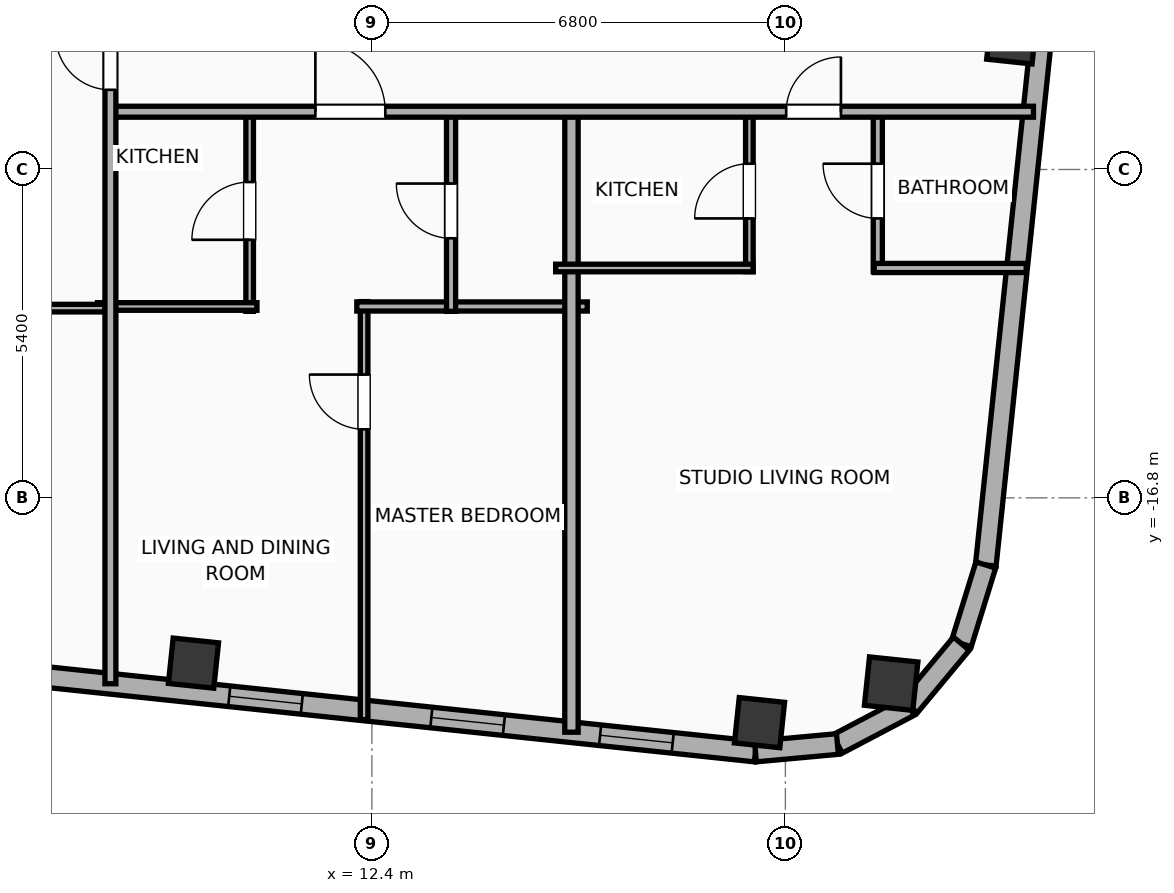
"""IFC4 building model, lengths in metres.
Left out: names, types, materials, properties, quantities, classifications, styles, units other than length and angle.
Written with IfcOpenShell. Run it as: python <this file> out.ifc"""

import sys

from ifc_helpers import new_model, si_unit, direction, frame, frame_2d, origin, origin_2d, place, context, subcontext, project, spatial, rectangle, hollow_rectangle, hollow_circle, extrude, element, fill, save


model = new_model("IFC4")
c1 = context("Model", 3, precision=1e-05, world=origin(), true_north=direction((0.0, 1.0)))
c2 = subcontext(c1, "Body", "Model", "MODEL_VIEW")
j1 = project(units=[si_unit("LENGTHUNIT", "METRE"), si_unit("PLANEANGLEUNIT", "RADIAN")], contexts=[c1])
p1 = place(None, origin())
s1 = spatial("IfcSite", under=j1, at=p1, CompositionType="ELEMENT")
p2 = place(p1, origin())
s2 = spatial("IfcBuilding", under=s1, at=p2, CompositionType="ELEMENT")
p3 = place(p2, frame((0.0, 0.0, 263.9)))
s3 = spatial("IfcBuildingStorey", under=s2, at=p3, CompositionType="ELEMENT", Elevation=263.9)
for number, where, z_axis, x_axis in (
    (1, (9.466, -19.518, 0.0), (0.0, 0.0, 1.0), (0.995, -0.105, 0.0)),
    (2, (18.775, -20.497, 0.0), (0.0, 0.0, 1.0), (0.995, -0.105, 0.0)),
):
    element("IfcColumn", number, at=place(p3, frame(where, z_axis=z_axis, x_axis=x_axis)), inside=s3, PredefinedType="COLUMN", context=c2, shape_type="SweptSolid", body=[
        extrude(hollow_rectangle(XDim=0.75, YDim=0.75, WallThickness=0.025, at=origin_2d()), origin(), (0.0, 0.0, 1.0), 3.9),
    ])
p4 = place(p3, frame((20.939, -19.855, 0.0), z_axis=(0.0, 0.0, 1.0), x_axis=(0.994521895368, -0.104528463268, 0.0)))
e3 = element("IfcColumn", 3, at=p4, inside=s3, PredefinedType="COLUMN", context=c2, shape_type="SweptSolid", body=[
    extrude(hollow_circle(Radius=0.4, WallThickness=0.028, at=origin_2d()), origin(), (0.0, 0.0, 1.0), 3.9),
])
p5 = place(p3, frame((22.923, -9.252, 0.0), z_axis=(0.0, 0.0, 1.0), x_axis=(0.994521895368, -0.104528463268, 0.0)))
e4 = element("IfcColumn", 4, at=p5, inside=s3, PredefinedType="COLUMN", context=c2, shape_type="SweptSolid", body=[
    extrude(hollow_rectangle(XDim=0.75, YDim=0.75, WallThickness=0.025, at=origin_2d()), origin(), (0.0, 0.0, 1.0), 3.9),
])
p6 = place(p3, frame((18.708, -20.972, 0.0), z_axis=(0.0, 0.0, 1.0), x_axis=(-0.994521888554, 0.104528528102, 0.0)))
e5 = element("IfcWall", 5, at=p6, inside=s3, PredefinedType="ELEMENTEDWALL", context=c2, shape_type="SweptSolid", body=[
    extrude(rectangle(XDim=46.766, YDim=0.34, at=frame_2d((23.383, 0.0))), origin(), (0.0, 0.0, 1.0), 3.65),
])
p7 = place(p6, frame((23.833, 0.0, 0.75)))
e6 = element("IfcOpeningElement", 6, at=p7, cuts=e5, PredefinedType="OPENING", context=c2, shape_type="SweptSolid", body=[
    extrude(rectangle(XDim=2.4, YDim=2.1, at=frame_2d((1.2, 1.05))), frame((0.0, 0.18, 0.0), z_axis=(0.0, -1.0, 0.0), x_axis=(1.0, 0.0, 0.0)), (0.0, 0.0, 1.0), 0.36),
])
p8 = place(p6, frame((38.622, 0.0, 0.75)))
e7 = element("IfcOpeningElement", 7, at=p8, cuts=e5, PredefinedType="OPENING", context=c2, shape_type="SweptSolid", body=[
    extrude(rectangle(XDim=2.4, YDim=2.1, at=frame_2d((1.2, 1.05))), frame((0.0, 0.18, 0.0), z_axis=(0.0, -1.0, 0.0), x_axis=(1.0, 0.0, 0.0)), (0.0, 0.0, 1.0), 0.36),
])
p9 = place(p6, frame((44.402, 0.0, 0.75)))
e8 = element("IfcOpeningElement", 8, at=p9, cuts=e5, PredefinedType="OPENING", context=c2, shape_type="SweptSolid", body=[
    extrude(rectangle(XDim=1.2, YDim=2.05, at=frame_2d((0.6, 1.025))), frame((0.0, 0.18, 0.0), z_axis=(0.0, -1.0, 0.0), x_axis=(1.0, 0.0, 0.0)), (0.0, 0.0, 1.0), 0.36),
])
p10 = place(p6, frame((42.406, 0.0, 0.75)))
e9 = element("IfcOpeningElement", 9, at=p10, cuts=e5, PredefinedType="OPENING", context=c2, shape_type="SweptSolid", body=[
    extrude(rectangle(XDim=1.2, YDim=2.05, at=frame_2d((0.6, 1.025))), frame((0.0, 0.18, 0.0), z_axis=(0.0, -1.0, 0.0), x_axis=(1.0, 0.0, 0.0)), (0.0, 0.0, 1.0), 0.36),
])
p11 = place(p6, frame((34.933, 0.0, 0.75)))
e10 = element("IfcOpeningElement", 10, at=p11, cuts=e5, PredefinedType="OPENING", context=c2, shape_type="SweptSolid", body=[
    extrude(rectangle(XDim=1.2, YDim=2.05, at=frame_2d((0.6, 1.025))), frame((0.0, 0.18, 0.0), z_axis=(0.0, -1.0, 0.0), x_axis=(1.0, 0.0, 0.0)), (0.0, 0.0, 1.0), 0.36),
])
p12 = place(p6, frame((28.631, 0.0, 0.75)))
e11 = element("IfcOpeningElement", 11, at=p12, cuts=e5, PredefinedType="OPENING", context=c2, shape_type="SweptSolid", body=[
    extrude(rectangle(XDim=1.2, YDim=2.05, at=frame_2d((0.6, 1.025))), frame((0.0, 0.18, 0.0), z_axis=(0.0, -1.0, 0.0), x_axis=(1.0, 0.0, 0.0)), (0.0, 0.0, 1.0), 0.36),
])
p13 = place(p6, frame((30.896, 0.0, 0.75)))
e12 = element("IfcOpeningElement", 12, at=p13, cuts=e5, PredefinedType="OPENING", context=c2, shape_type="SweptSolid", body=[
    extrude(rectangle(XDim=1.2, YDim=2.05, at=frame_2d((0.6, 1.025))), frame((0.0, 0.18, 0.0), z_axis=(0.0, -1.0, 0.0), x_axis=(1.0, 0.0, 0.0)), (0.0, 0.0, 1.0), 0.36),
])
p14 = place(p6, frame((7.501, 0.0, 0.75)))
e13 = element("IfcOpeningElement", 13, at=p14, cuts=e5, PredefinedType="OPENING", context=c2, shape_type="SweptSolid", body=[
    extrude(rectangle(XDim=1.2, YDim=2.05, at=frame_2d((0.6, 1.025))), frame((0.0, 0.18, 0.0), z_axis=(0.0, -1.0, 0.0), x_axis=(1.0, 0.0, 0.0)), (0.0, 0.0, 1.0), 0.36),
])
p15 = place(p6, frame((4.159, 0.0, 0.75)))
e14 = element("IfcOpeningElement", 14, at=p15, cuts=e5, PredefinedType="OPENING", context=c2, shape_type="SweptSolid", body=[
    extrude(rectangle(XDim=1.2, YDim=2.05, at=frame_2d((0.6, 1.025))), frame((0.0, 0.18, 0.0), z_axis=(0.0, -1.0, 0.0), x_axis=(1.0, 0.0, 0.0)), (0.0, 0.0, 1.0), 0.36),
])
p16 = place(p6, frame((1.369, 0.0, 0.75)))
e15 = element("IfcOpeningElement", 15, at=p16, cuts=e5, PredefinedType="OPENING", context=c2, shape_type="SweptSolid", body=[
    extrude(rectangle(XDim=1.2, YDim=2.05, at=frame_2d((0.6, 1.025))), frame((0.0, 0.18, 0.0), z_axis=(0.0, -1.0, 0.0), x_axis=(1.0, 0.0, 0.0)), (0.0, 0.0, 1.0), 0.36),
])
p17 = place(p6, frame((20.254, 0.0, 0.75)))
e16 = element("IfcOpeningElement", 16, at=p17, cuts=e5, PredefinedType="OPENING", context=c2, shape_type="SweptSolid", body=[
    extrude(rectangle(XDim=1.2, YDim=2.05, at=frame_2d((0.6, 1.025))), frame((0.0, 0.18, 0.0), z_axis=(0.0, -1.0, 0.0), x_axis=(1.0, 0.0, 0.0)), (0.0, 0.0, 1.0), 0.36),
])
p18 = place(p6, frame((16.172, 0.0, 0.75)))
e17 = element("IfcOpeningElement", 17, at=p18, cuts=e5, PredefinedType="OPENING", context=c2, shape_type="SweptSolid", body=[
    extrude(rectangle(XDim=1.2, YDim=2.05, at=frame_2d((0.6, 1.025))), frame((0.0, 0.18, 0.0), z_axis=(0.0, -1.0, 0.0), x_axis=(1.0, 0.0, 0.0)), (0.0, 0.0, 1.0), 0.36),
])
p19 = place(p6, frame((12.11, 0.0, 0.75)))
e18 = element("IfcOpeningElement", 18, at=p19, cuts=e5, PredefinedType="OPENING", context=c2, shape_type="SweptSolid", body=[
    extrude(rectangle(XDim=1.2, YDim=2.05, at=frame_2d((0.6, 1.025))), frame((0.0, 0.18, 0.0), z_axis=(0.0, -1.0, 0.0), x_axis=(1.0, 0.0, 0.0)), (0.0, 0.0, 1.0), 0.36),
])
p20 = place(p3, frame((25.67, 12.296, 0.0), z_axis=(0.0, 0.0, 1.0), x_axis=(-0.104533282919, -0.994521388791, 0.0)))
e19 = element("IfcWall", 19, at=p20, inside=s3, PredefinedType="ELEMENTEDWALL", context=c2, shape_type="SweptSolid", body=[
    extrude(rectangle(XDim=30.366, YDim=0.34, at=frame_2d((15.183, 0.0))), origin(), (0.0, 0.0, 1.0), 3.65),
])
p21 = place(p20, frame((5.842, 0.0, 0.75)))
e20 = element("IfcOpeningElement", 20, at=p21, cuts=e19, PredefinedType="OPENING", context=c2, shape_type="SweptSolid", body=[
    extrude(rectangle(XDim=1.8, YDim=2.1, at=frame_2d((0.9, 1.05))), frame((0.0, 0.18, 0.0), z_axis=(0.0, -1.0, 0.0), x_axis=(1.0, 0.0, 0.0)), (0.0, 0.0, 1.0), 0.36),
])
p22 = place(p20, frame((18.005, 0.0, 0.75)))
e21 = element("IfcOpeningElement", 21, at=p22, cuts=e19, PredefinedType="OPENING", context=c2, shape_type="SweptSolid", body=[
    extrude(rectangle(XDim=1.2, YDim=2.05, at=frame_2d((0.6, 1.025))), frame((0.0, 0.18, 0.0), z_axis=(0.0, -1.0, 0.0), x_axis=(1.0, 0.0, 0.0)), (0.0, 0.0, 1.0), 0.36),
])
p23 = place(p3, frame((22.496, -17.905, 0.0), z_axis=(0.0, 0.0, 1.0), x_axis=(-0.296416228123, -0.955058856671, 0.0)))
e22 = element("IfcWall", 22, at=p23, inside=s3, PredefinedType="ELEMENTEDWALL", context=c2, shape_type="SweptSolid", body=[
    extrude(rectangle(XDim=1.354, YDim=0.34, at=frame_2d((0.677, 0.0))), origin(), (0.0, 0.0, 1.0), 3.65),
])
p24 = place(p3, frame((22.094, -19.198, 0.0), z_axis=(0.0, 0.0, 1.0), x_axis=(-0.639501603217, -0.768789762863, 0.0)))
e23 = element("IfcWall", 23, at=p24, inside=s3, PredefinedType="ELEMENTEDWALL", context=c2, shape_type="SweptSolid", body=[
    extrude(rectangle(XDim=1.337, YDim=0.34, at=frame_2d((0.668, 0.0))), origin(), (0.0, 0.0, 1.0), 3.65),
])
p25 = place(p3, frame((21.24, -20.226, 0.0), z_axis=(0.0, 0.0, 1.0), x_axis=(-0.884922182678, -0.465738908193, 0.0)))
e24 = element("IfcWall", 24, at=p25, inside=s3, PredefinedType="ELEMENTEDWALL", context=c2, shape_type="SweptSolid", body=[
    extrude(rectangle(XDim=1.337, YDim=0.34, at=frame_2d((0.668, 0.0))), origin(), (0.0, 0.0, 1.0), 3.65),
])
p26 = place(p3, frame((20.056, -20.848, 0.0), z_axis=(0.0, 0.0, 1.0), x_axis=(-0.995813013343, -0.091413579172, 0.0)))
e25 = element("IfcWall", 25, at=p26, inside=s3, PredefinedType="ELEMENTEDWALL", context=c2, shape_type="SweptSolid", body=[
    extrude(rectangle(XDim=1.354, YDim=0.34, at=frame_2d((0.677, 0.0))), origin(), (0.0, 0.0, 1.0), 3.65),
])
p27 = place(p3, frame((12.272, -20.447, 0.0), z_axis=(0.0, 0.0, 1.0), x_axis=(0.0, 1.0, 0.0)))
e26 = element("IfcWall", 26, at=p27, inside=s3, PredefinedType="PARTITIONING", context=c2, shape_type="SweptSolid", body=[
    extrude(rectangle(XDim=6.874, YDim=0.125, at=frame_2d((3.437, 0.0))), origin(), (0.0, 0.0, 1.0), 3.65),
])
p28 = place(p27, frame((4.774, 0.0, 0.0)))
e27 = element("IfcOpeningElement", 27, at=p28, cuts=e26, PredefinedType="OPENING", context=c2, shape_type="SweptSolid", body=[
    extrude(rectangle(XDim=0.9, YDim=2.05, at=frame_2d((0.45, 1.025))), frame((0.0, 0.073, 0.0), z_axis=(0.0, -1.0, 0.0), x_axis=(1.0, 0.0, 0.0)), (0.0, 0.0, 1.0), 0.145),
])
p29 = place(p3, frame((12.152, -13.653, 0.0), z_axis=(0.0, 0.0, 1.0), x_axis=(1.0, 0.0, 0.0)))
e28 = element("IfcWall", 28, at=p29, inside=s3, PredefinedType="PLUMBINGWALL", context=c2, shape_type="SweptSolid", body=[
    extrude(rectangle(XDim=3.79, YDim=0.15, at=frame_2d((1.895, 0.0))), origin(), (0.0, 0.0, 1.0), 3.65),
])
p30 = place(p3, frame((10.39, -13.733, 0.0), z_axis=(0.0, 0.0, 1.0), x_axis=(0.0, 1.0, 0.0)))
e29 = element("IfcWall", 29, at=p30, inside=s3, PredefinedType="PARTITIONING", context=c2, shape_type="SweptSolid", body=[
    extrude(rectangle(XDim=3.303, YDim=0.125, at=frame_2d((1.651, 0.0))), origin(), (0.0, 0.0, 1.0), 3.65),
])
p31 = place(p30, frame((1.177, 0.0, 0.0)))
e30 = element("IfcOpeningElement", 30, at=p31, cuts=e29, PredefinedType="OPENING", context=c2, shape_type="SweptSolid", body=[
    extrude(rectangle(XDim=0.95, YDim=2.05, at=frame_2d((0.475, 1.025))), frame((0.0, 0.073, 0.0), z_axis=(0.0, -1.0, 0.0), x_axis=(1.0, 0.0, 0.0)), (0.0, 0.0, 1.0), 0.145),
])
p32 = place(p3, frame((7.887, -13.653, 0.0), z_axis=(0.0, 0.0, 1.0), x_axis=(1.0, 0.0, 0.0)))
e31 = element("IfcWall", 31, at=p32, inside=s3, PredefinedType="PARTITIONING", context=c2, shape_type="SweptSolid", body=[
    extrude(rectangle(XDim=2.623, YDim=0.125, at=frame_2d((1.311, 0.0))), origin(), (0.0, 0.0, 1.0), 3.65),
])
p33 = place(p3, frame((13.702, -13.733, 0.0), z_axis=(0.0, 0.0, 1.0), x_axis=(0.0, 1.0, 0.0)))
e32 = element("IfcWall", 32, at=p33, inside=s3, PredefinedType="PLUMBINGWALL", context=c2, shape_type="SweptSolid", body=[
    extrude(rectangle(XDim=3.303, YDim=0.15, at=frame_2d((1.651, 0.0))), origin(), (0.0, 0.0, 1.0), 3.65),
])
p34 = place(p33, frame((1.201, 0.0, 0.0)))
e33 = element("IfcOpeningElement", 33, at=p34, cuts=e32, PredefinedType="OPENING", context=c2, shape_type="SweptSolid", body=[
    extrude(rectangle(XDim=0.9, YDim=2.05, at=frame_2d((0.45, 1.025))), frame((0.0, 0.085, 0.0), z_axis=(0.0, -1.0, 0.0), x_axis=(1.0, 0.0, 0.0)), (0.0, 0.0, 1.0), 0.17),
])
p35 = place(p3, frame((15.682, -20.654, 0.0), z_axis=(0.0, 0.0, 1.0), x_axis=(0.0, 1.0, 0.0)))
e34 = element("IfcWall", 34, at=p35, inside=s3, PredefinedType="PARTITIONING", context=c2, shape_type="SweptSolid", body=[
    extrude(rectangle(XDim=10.284, YDim=0.22, at=frame_2d((5.142, 0.0))), origin(), (0.0, 0.0, 1.0), 3.65),
])
p36 = place(p3, frame((18.608, -13.08, 0.0), z_axis=(0.0, 0.0, 1.0), x_axis=(0.0, 1.0, 0.0)))
e35 = element("IfcWall", 35, at=p36, inside=s3, PredefinedType="PARTITIONING", context=c2, shape_type="SweptSolid", body=[
    extrude(rectangle(XDim=2.65, YDim=0.125, at=frame_2d((1.325, 0.0))), origin(), (0.0, 0.0, 1.0), 3.65),
])
p37 = place(p36, frame((0.875, 0.0, 0.0)))
e36 = element("IfcOpeningElement", 36, at=p37, cuts=e35, PredefinedType="OPENING", context=c2, shape_type="SweptSolid", body=[
    extrude(rectangle(XDim=0.9, YDim=2.05, at=frame_2d((0.45, 1.025))), frame((0.0, 0.073, 0.0), z_axis=(0.0, -1.0, 0.0), x_axis=(1.0, 0.0, 0.0)), (0.0, 0.0, 1.0), 0.145),
])
p38 = place(p3, frame((20.72, -13.08, 0.0), z_axis=(0.0, 0.0, 1.0), x_axis=(0.0, 1.0, 0.0)))
e37 = element("IfcWall", 37, at=p38, inside=s3, PredefinedType="PLUMBINGWALL", context=c2, shape_type="SweptSolid", body=[
    extrude(rectangle(XDim=2.65, YDim=0.15, at=frame_2d((1.325, 0.0))), origin(), (0.0, 0.0, 1.0), 3.65),
])
p39 = place(p38, frame((0.875, 0.0, 0.0)))
e38 = element("IfcOpeningElement", 38, at=p39, cuts=e37, PredefinedType="OPENING", context=c2, shape_type="SweptSolid", body=[
    extrude(rectangle(XDim=0.9, YDim=2.05, at=frame_2d((0.45, 1.025))), frame((0.0, 0.085, 0.0), z_axis=(0.0, -1.0, 0.0), x_axis=(1.0, 0.0, 0.0)), (0.0, 0.0, 1.0), 0.17),
])
p40 = place(p3, frame((15.422, -13.02, 0.0), z_axis=(0.0, 0.0, 1.0), x_axis=(1.0, 0.0, 0.0)))
e39 = element("IfcWall", 39, at=p40, inside=s3, PredefinedType="PARTITIONING", context=c2, shape_type="SweptSolid", body=[
    extrude(rectangle(XDim=3.246, YDim=0.125, at=frame_2d((1.623, 0.0))), origin(), (0.0, 0.0, 1.0), 3.65),
])
p41 = place(p3, frame((20.66, -13.02, 0.0), z_axis=(0.0, 0.0, 1.0), x_axis=(1.0, 0.0, 0.0)))
e40 = element("IfcWall", 40, at=p41, inside=s3, PredefinedType="PLUMBINGWALL", context=c2, shape_type="SweptSolid", body=[
    extrude(rectangle(XDim=2.5, YDim=0.15, at=frame_2d((1.25, 0.0))), origin(), (0.0, 0.0, 1.0), 3.65),
])
p42 = place(p3, frame((8.08, -10.45, 0.0), z_axis=(0.0, 0.0, 1.0), x_axis=(1.0, 0.0, 0.0)))
e41 = element("IfcWall", 41, at=p42, inside=s3, PredefinedType="PARTITIONING", context=c2, shape_type="SweptSolid", body=[
    extrude(rectangle(XDim=15.199, YDim=0.18, at=frame_2d((7.6, 0.0))), origin(), (0.0, 0.0, 1.0), 3.65),
])
p43 = place(p42, frame((3.39, 0.0, 0.0)))
e42 = element("IfcOpeningElement", 42, at=p43, cuts=e41, PredefinedType="OPENING", context=c2, shape_type="SweptSolid", body=[
    extrude(rectangle(XDim=1.15, YDim=2.05, at=frame_2d((0.575, 1.025))), frame((0.0, 0.1, 0.0), z_axis=(0.0, -1.0, 0.0), x_axis=(1.0, 0.0, 0.0)), (0.0, 0.0, 1.0), 0.2),
])
p44 = place(p42, frame((11.134, 0.0, 0.0)))
e43 = element("IfcOpeningElement", 43, at=p44, cuts=e41, PredefinedType="OPENING", context=c2, shape_type="SweptSolid", body=[
    extrude(rectangle(XDim=0.9, YDim=2.05, at=frame_2d((0.45, 1.025))), frame((0.0, 0.1, 0.0), z_axis=(0.0, -1.0, 0.0), x_axis=(1.0, 0.0, 0.0)), (0.0, 0.0, 1.0), 0.2),
])
p45 = place(p3, frame((0.02, -13.68, 0.0), z_axis=(0.0, 0.0, 1.0), x_axis=(1.0, 0.0, 0.0)))
e44 = element("IfcWall", 44, at=p45, inside=s3, PredefinedType="PARTITIONING", context=c2, shape_type="SweptSolid", body=[
    extrude(rectangle(XDim=7.992, YDim=0.125, at=frame_2d((3.996, 0.0))), origin(), (0.0, 0.0, 1.0), 3.65),
])
p46 = place(p45, frame((1.323, 0.0, 0.0)))
e45 = element("IfcOpeningElement", 45, at=p46, cuts=e44, PredefinedType="OPENING", context=c2, shape_type="SweptSolid", body=[
    extrude(rectangle(XDim=0.9, YDim=2.05, at=frame_2d((0.45, 1.025))), frame((0.0, 0.073, 0.0), z_axis=(0.0, -1.0, 0.0), x_axis=(1.0, 0.0, 0.0)), (0.0, 0.0, 1.0), 0.145),
])
p47 = place(p45, frame((5.837, 0.0, 0.0)))
e46 = element("IfcOpeningElement", 46, at=p47, cuts=e44, PredefinedType="OPENING", context=c2, shape_type="SweptSolid", body=[
    extrude(rectangle(XDim=0.9, YDim=2.05, at=frame_2d((0.45, 1.025))), frame((0.0, 0.073, 0.0), z_axis=(0.0, -1.0, 0.0), x_axis=(1.0, 0.0, 0.0)), (0.0, 0.0, 1.0), 0.145),
])
p48 = place(p3, frame((8.1, -19.857, 0.0), z_axis=(0.0, 0.0, 1.0), x_axis=(0.0, 1.0, 0.0)))
e47 = element("IfcWall", 47, at=p48, inside=s3, PredefinedType="PARTITIONING", context=c2, shape_type="SweptSolid", body=[
    extrude(rectangle(XDim=11.017, YDim=0.18, at=frame_2d((5.509, 0.0))), origin(), (0.0, 0.0, 1.0), 3.65),
])
p49 = place(p48, frame((9.767, 0.0, 0.0)))
e48 = element("IfcOpeningElement", 48, at=p49, cuts=e47, PredefinedType="OPENING", context=c2, shape_type="SweptSolid", body=[
    extrude(rectangle(XDim=0.9, YDim=2.05, at=frame_2d((0.45, 1.025))), frame((0.0, 0.1, 0.0), z_axis=(0.0, -1.0, 0.0), x_axis=(1.0, 0.0, 0.0)), (0.0, 0.0, 1.0), 0.2),
])
p50 = place(p14, origin())
e49 = element("IfcWindow", 49, at=p50, inside=s3, PartitioningType="SINGLE_PANEL", PredefinedType="WINDOW", context=c2, shape_type="SweptSolid", body=[
    extrude(rectangle(XDim=1.2, YDim=2.05, at=frame_2d((0.6, 1.025))), frame((0.0, 0.03, 0.0), z_axis=(0.0, -1.0, 0.0), x_axis=(1.0, 0.0, 0.0)), (0.0, 0.0, 1.0), 0.06),
])
fill(e13, e49)
p51 = place(p15, origin())
e50 = element("IfcWindow", 50, at=p51, inside=s3, PartitioningType="SINGLE_PANEL", PredefinedType="WINDOW", context=c2, shape_type="SweptSolid", body=[
    extrude(rectangle(XDim=1.2, YDim=2.05, at=frame_2d((0.6, 1.025))), frame((0.0, 0.03, 0.0), z_axis=(0.0, -1.0, 0.0), x_axis=(1.0, 0.0, 0.0)), (0.0, 0.0, 1.0), 0.06),
])
fill(e14, e50)
p52 = place(p16, origin())
e51 = element("IfcWindow", 51, at=p52, inside=s3, PartitioningType="SINGLE_PANEL", PredefinedType="WINDOW", context=c2, shape_type="SweptSolid", body=[
    extrude(rectangle(XDim=1.2, YDim=2.05, at=frame_2d((0.6, 1.025))), frame((0.0, 0.03, 0.0), z_axis=(0.0, -1.0, 0.0), x_axis=(1.0, 0.0, 0.0)), (0.0, 0.0, 1.0), 0.06),
])
fill(e15, e51)
p53 = place(p28, origin())
e52 = element("IfcDoor", 52, at=p53, inside=s3, OperationType="SINGLE_SWING_RIGHT", PredefinedType="DOOR", context=c2, shape_type="SweptSolid", body=[
    extrude(rectangle(XDim=0.9, YDim=2.05, at=frame_2d((0.45, 1.025))), frame((0.0, 0.025, 0.0), z_axis=(0.0, -1.0, 0.0), x_axis=(1.0, 0.0, 0.0)), (0.0, 0.0, 1.0), 0.05),
])
fill(e27, e52)
p54 = place(p31, origin())
e53 = element("IfcDoor", 53, at=p54, inside=s3, OperationType="SINGLE_SWING_LEFT", PredefinedType="DOOR", context=c2, shape_type="SweptSolid", body=[
    extrude(rectangle(XDim=0.95, YDim=2.05, at=frame_2d((0.475, 1.025))), frame((0.0, 0.025, 0.0), z_axis=(0.0, -1.0, 0.0), x_axis=(1.0, 0.0, 0.0)), (0.0, 0.0, 1.0), 0.05),
])
fill(e30, e53)
p55 = place(p34, origin())
e54 = element("IfcDoor", 54, at=p55, inside=s3, OperationType="SINGLE_SWING_RIGHT", PredefinedType="DOOR", context=c2, shape_type="SweptSolid", body=[
    extrude(rectangle(XDim=0.9, YDim=2.05, at=frame_2d((0.45, 1.025))), frame((0.0, 0.025, 0.0), z_axis=(0.0, -1.0, 0.0), x_axis=(1.0, 0.0, 0.0)), (0.0, 0.0, 1.0), 0.05),
])
fill(e33, e54)
p56 = place(p37, origin())
e55 = element("IfcDoor", 55, at=p56, inside=s3, OperationType="SINGLE_SWING_LEFT", PredefinedType="DOOR", context=c2, shape_type="SweptSolid", body=[
    extrude(rectangle(XDim=0.9, YDim=2.05, at=frame_2d((0.45, 1.025))), frame((0.0, 0.025, 0.0), z_axis=(0.0, -1.0, 0.0), x_axis=(1.0, 0.0, 0.0)), (0.0, 0.0, 1.0), 0.05),
])
fill(e36, e55)
p57 = place(p39, origin())
e56 = element("IfcDoor", 56, at=p57, inside=s3, OperationType="SINGLE_SWING_RIGHT", PredefinedType="DOOR", context=c2, shape_type="SweptSolid", body=[
    extrude(rectangle(XDim=0.9, YDim=2.05, at=frame_2d((0.45, 1.025))), frame((0.0, 0.025, 0.0), z_axis=(0.0, -1.0, 0.0), x_axis=(1.0, 0.0, 0.0)), (0.0, 0.0, 1.0), 0.05),
])
fill(e38, e56)
p58 = place(p43, origin())
e57 = element("IfcDoor", 57, at=p58, inside=s3, OperationType="SINGLE_SWING_LEFT", PredefinedType="DOOR", context=c2, shape_type="SweptSolid", body=[
    extrude(rectangle(XDim=1.15, YDim=2.05, at=frame_2d((0.575, 1.025))), frame((0.0, 0.025, 0.0), z_axis=(0.0, -1.0, 0.0), x_axis=(1.0, 0.0, 0.0)), (0.0, 0.0, 1.0), 0.05),
])
fill(e42, e57)
p59 = place(p44, origin())
e58 = element("IfcDoor", 58, at=p59, inside=s3, OperationType="SINGLE_SWING_RIGHT", PredefinedType="DOOR", context=c2, shape_type="SweptSolid", body=[
    extrude(rectangle(XDim=0.9, YDim=2.05, at=frame_2d((0.45, 1.025))), frame((0.0, 0.025, 0.0), z_axis=(0.0, -1.0, 0.0), x_axis=(1.0, 0.0, 0.0)), (0.0, 0.0, 1.0), 0.05),
])
fill(e43, e58)
p60 = place(p49, origin())
e59 = element("IfcDoor", 59, at=p60, inside=s3, OperationType="SINGLE_SWING_RIGHT", PredefinedType="DOOR", context=c2, shape_type="SweptSolid", body=[
    extrude(rectangle(XDim=0.9, YDim=2.05, at=frame_2d((0.45, 1.025))), frame((0.0, 0.025, 0.0), z_axis=(0.0, -1.0, 0.0), x_axis=(1.0, 0.0, 0.0)), (0.0, 0.0, 1.0), 0.05),
])
fill(e48, e59)
save(model, sys.argv[1])
